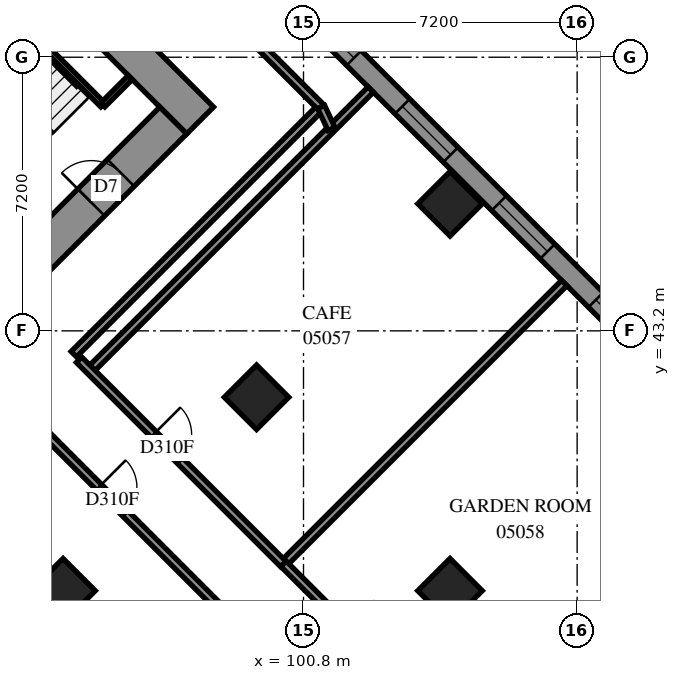
"""IFC4 building model, lengths in metres.
Left out: names, types, materials, properties, quantities, classifications, styles, units other than length and angle.
Written with IfcOpenShell. Run it as: python <this file> out.ifc"""

import sys

from ifc_helpers import new_model, si_unit, direction, frame, frame_2d, origin, origin_2d, place, context, subcontext, project, spatial, polyline, rectangle, outline, extrude, element, fill, save


model = new_model("IFC4")
c1 = context("Model", 3, precision=1e-05, world=origin(), true_north=direction((0.0, 1.0)))
c2 = subcontext(c1, "Body", "Model", "MODEL_VIEW")
j1 = project(units=[si_unit("LENGTHUNIT", "METRE"), si_unit("PLANEANGLEUNIT", "RADIAN")], contexts=[c1])
p1 = place(None, origin())
s1 = spatial("IfcSite", under=j1, at=p1, CompositionType="ELEMENT")
p2 = place(p1, origin())
s2 = spatial("IfcBuilding", under=s1, at=p2, CompositionType="ELEMENT")
p3 = place(p2, frame((0.0, 0.0, 22.8)))
s3 = spatial("IfcBuildingStorey", under=s2, at=p3, CompositionType="ELEMENT", Elevation=22.8)
for number, where, z_axis, x_axis in (
    (1, (104.656, 46.544, 0.0), (0.0, 0.0, 1.0), (0.707, -0.707, 0.0)),
    (2, (99.565, 41.453, 0.0), (0.0, 0.0, 1.0), (0.707, -0.707, 0.0)),
    (3, (94.474, 36.362, 0.0), (0.0, 0.0, 1.0), (0.707, -0.707, 0.0)),
    (4, (104.656, 36.362, 0.0), (0.0, 0.0, 1.0), (0.707, -0.707, 0.0)),
):
    element("IfcColumn", number, at=place(p3, frame(where, z_axis=z_axis, x_axis=x_axis)), inside=s3, PredefinedType="COLUMN", context=c2, shape_type="SweptSolid", body=[
        extrude(rectangle(XDim=1.2, YDim=1.2, at=origin_2d()), origin(), (0.0, 0.0, 1.0), 3.9),
    ])
p4 = place(p3, frame((86.483, 60.333, -0.4), z_axis=(0.0, 0.0, 1.0), x_axis=(0.70710983, -0.7071037324, 0.0)))
e5 = element("IfcWall", 5, at=p4, inside=s3, PredefinedType="SHEAR", context=c2, shape_type="SweptSolid", body=[
    extrude(rectangle(XDim=16.4, YDim=1.0, at=frame_2d((8.2, 0.0))), origin(), (0.0, 0.0, 1.0), 3.6),
])
p5 = place(p4, frame((11.0, 0.0, 0.4)))
e6 = element("IfcOpeningElement", 6, at=p5, cuts=e5, PredefinedType="OPENING", context=c2, shape_type="SweptSolid", body=[
    extrude(rectangle(XDim=0.8, YDim=2.1, at=frame_2d((0.4, 1.05))), frame((0.0, 0.51, 0.0), z_axis=(0.0, -1.0, 0.0), x_axis=(1.0, 0.0, 0.0)), (0.0, 0.0, 1.0), 1.02),
])
p6 = place(p3, frame((87.19, 38.554, -0.4), z_axis=(0.0, 0.0, 1.0), x_axis=(0.707103309, 0.7071102534, 0.0)))
e7 = element("IfcWall", 7, at=p6, inside=s3, PredefinedType="SHEAR", context=c2, shape_type="SweptSolid", body=[
    extrude(rectangle(XDim=14.4, YDim=1.0, at=frame_2d((7.2, 0.0))), origin(), (0.0, 0.0, 1.0), 3.6),
])
p7 = place(p6, frame((4.55, 0.0, 0.4)))
e8 = element("IfcOpeningElement", 8, at=p7, cuts=e7, PredefinedType="OPENING", context=c2, shape_type="SweptSolid", body=[
    extrude(rectangle(XDim=1.1, YDim=2.1, at=frame_2d((0.55, 1.05))), frame((0.0, 0.51, 0.0), z_axis=(0.0, -1.0, 0.0), x_axis=(1.0, 0.0, 0.0)), (0.0, 0.0, 1.0), 1.02),
])
p8 = place(p6, frame((11.35, 0.0, 0.4)))
e9 = element("IfcOpeningElement", 9, at=p8, cuts=e7, PredefinedType="OPENING", context=c2, shape_type="SweptSolid", body=[
    extrude(rectangle(XDim=1.1, YDim=2.1, at=frame_2d((0.55, 1.05))), frame((0.0, 0.51, 0.0), z_axis=(0.0, -1.0, 0.0), x_axis=(1.0, 0.0, 0.0)), (0.0, 0.0, 1.0), 1.02),
])
p9 = place(p3, frame((117.843, 34.665, 0.0), z_axis=(0.0, 0.0, 1.0), x_axis=(-0.7071067812, 0.7071067812, 0.0)))
e10 = element("IfcWall", 10, at=p9, inside=s3, PredefinedType="SOLIDWALL", context=c2, shape_type="SweptSolid", body=[
    extrude(outline(polyline([(-0.275, -0.275), (54.222, -0.275), (53.994, 0.275), (0.275, 0.275), (-0.275, -0.275)])), origin(), (0.0, 0.0, 1.0), 3.9),
])
p10 = place(p9, frame((0.8, 0.0, 0.7)))
e11 = element("IfcOpeningElement", 11, at=p10, cuts=e10, PredefinedType="OPENING", context=c2, shape_type="SweptSolid", body=[
    extrude(rectangle(XDim=1.8, YDim=2.4, at=frame_2d((0.9, 1.2))), frame((0.0, 0.285, 0.0), z_axis=(0.0, -1.0, 0.0), x_axis=(1.0, 0.0, 0.0)), (0.0, 0.0, 1.0), 0.57),
])
p11 = place(p9, frame((4.225, 0.0, 0.7)))
e12 = element("IfcOpeningElement", 12, at=p11, cuts=e10, PredefinedType="OPENING", context=c2, shape_type="SweptSolid", body=[
    extrude(rectangle(XDim=1.8, YDim=2.4, at=frame_2d((0.9, 1.2))), frame((0.0, 0.285, 0.0), z_axis=(0.0, -1.0, 0.0), x_axis=(1.0, 0.0, 0.0)), (0.0, 0.0, 1.0), 0.57),
])
p12 = place(p9, frame((7.825, 0.0, 0.7)))
e13 = element("IfcOpeningElement", 13, at=p12, cuts=e10, PredefinedType="OPENING", context=c2, shape_type="SweptSolid", body=[
    extrude(rectangle(XDim=1.8, YDim=2.4, at=frame_2d((0.9, 1.2))), frame((0.0, 0.285, 0.0), z_axis=(0.0, -1.0, 0.0), x_axis=(1.0, 0.0, 0.0)), (0.0, 0.0, 1.0), 0.57),
])
p13 = place(p9, frame((11.425, 0.0, 0.7)))
e14 = element("IfcOpeningElement", 14, at=p13, cuts=e10, PredefinedType="OPENING", context=c2, shape_type="SweptSolid", body=[
    extrude(rectangle(XDim=1.8, YDim=2.4, at=frame_2d((0.9, 1.2))), frame((0.0, 0.285, 0.0), z_axis=(0.0, -1.0, 0.0), x_axis=(1.0, 0.0, 0.0)), (0.0, 0.0, 1.0), 0.57),
])
p14 = place(p9, frame((15.025, 0.0, 0.7)))
e15 = element("IfcOpeningElement", 15, at=p14, cuts=e10, PredefinedType="OPENING", context=c2, shape_type="SweptSolid", body=[
    extrude(rectangle(XDim=1.8, YDim=2.4, at=frame_2d((0.9, 1.2))), frame((0.0, 0.285, 0.0), z_axis=(0.0, -1.0, 0.0), x_axis=(1.0, 0.0, 0.0)), (0.0, 0.0, 1.0), 0.57),
])
p15 = place(p9, frame((18.625, 0.0, 0.7)))
e16 = element("IfcOpeningElement", 16, at=p15, cuts=e10, PredefinedType="OPENING", context=c2, shape_type="SweptSolid", body=[
    extrude(rectangle(XDim=1.8, YDim=2.4, at=frame_2d((0.9, 1.2))), frame((0.0, 0.285, 0.0), z_axis=(0.0, -1.0, 0.0), x_axis=(1.0, 0.0, 0.0)), (0.0, 0.0, 1.0), 0.57),
])
p16 = place(p9, frame((22.225, 0.0, 0.7)))
e17 = element("IfcOpeningElement", 17, at=p16, cuts=e10, PredefinedType="OPENING", context=c2, shape_type="SweptSolid", body=[
    extrude(rectangle(XDim=1.8, YDim=2.4, at=frame_2d((0.9, 1.2))), frame((0.0, 0.285, 0.0), z_axis=(0.0, -1.0, 0.0), x_axis=(1.0, 0.0, 0.0)), (0.0, 0.0, 1.0), 0.57),
])
p17 = place(p9, frame((25.825, 0.0, 0.7)))
e18 = element("IfcOpeningElement", 18, at=p17, cuts=e10, PredefinedType="OPENING", context=c2, shape_type="SweptSolid", body=[
    extrude(rectangle(XDim=1.8, YDim=2.4, at=frame_2d((0.9, 1.2))), frame((0.0, 0.285, 0.0), z_axis=(0.0, -1.0, 0.0), x_axis=(1.0, 0.0, 0.0)), (0.0, 0.0, 1.0), 0.57),
])
p18 = place(p9, frame((29.425, 0.0, 0.7)))
e19 = element("IfcOpeningElement", 19, at=p18, cuts=e10, PredefinedType="OPENING", context=c2, shape_type="SweptSolid", body=[
    extrude(rectangle(XDim=1.8, YDim=2.4, at=frame_2d((0.9, 1.2))), frame((0.0, 0.285, 0.0), z_axis=(0.0, -1.0, 0.0), x_axis=(1.0, 0.0, 0.0)), (0.0, 0.0, 1.0), 0.57),
])
p19 = place(p9, frame((33.025, 0.0, 0.7)))
e20 = element("IfcOpeningElement", 20, at=p19, cuts=e10, PredefinedType="OPENING", context=c2, shape_type="SweptSolid", body=[
    extrude(rectangle(XDim=1.8, YDim=2.4, at=frame_2d((0.9, 1.2))), frame((0.0, 0.285, 0.0), z_axis=(0.0, -1.0, 0.0), x_axis=(1.0, 0.0, 0.0)), (0.0, 0.0, 1.0), 0.57),
])
p20 = place(p9, frame((36.625, 0.0, 0.7)))
e21 = element("IfcOpeningElement", 21, at=p20, cuts=e10, PredefinedType="OPENING", context=c2, shape_type="SweptSolid", body=[
    extrude(rectangle(XDim=1.8, YDim=2.4, at=frame_2d((0.9, 1.2))), frame((0.0, 0.285, 0.0), z_axis=(0.0, -1.0, 0.0), x_axis=(1.0, 0.0, 0.0)), (0.0, 0.0, 1.0), 0.57),
])
p21 = place(p9, frame((40.225, 0.0, 0.7)))
e22 = element("IfcOpeningElement", 22, at=p21, cuts=e10, PredefinedType="OPENING", context=c2, shape_type="SweptSolid", body=[
    extrude(rectangle(XDim=1.8, YDim=2.4, at=frame_2d((0.9, 1.2))), frame((0.0, 0.285, 0.0), z_axis=(0.0, -1.0, 0.0), x_axis=(1.0, 0.0, 0.0)), (0.0, 0.0, 1.0), 0.57),
])
p22 = place(p9, frame((43.825, 0.0, 0.7)))
e23 = element("IfcOpeningElement", 23, at=p22, cuts=e10, PredefinedType="OPENING", context=c2, shape_type="SweptSolid", body=[
    extrude(rectangle(XDim=1.8, YDim=2.4, at=frame_2d((0.9, 1.2))), frame((0.0, 0.285, 0.0), z_axis=(0.0, -1.0, 0.0), x_axis=(1.0, 0.0, 0.0)), (0.0, 0.0, 1.0), 0.57),
])
p23 = place(p9, frame((47.425, 0.0, 0.7)))
e24 = element("IfcOpeningElement", 24, at=p23, cuts=e10, PredefinedType="OPENING", context=c2, shape_type="SweptSolid", body=[
    extrude(rectangle(XDim=1.8, YDim=2.4, at=frame_2d((0.9, 1.2))), frame((0.0, 0.285, 0.0), z_axis=(0.0, -1.0, 0.0), x_axis=(1.0, 0.0, 0.0)), (0.0, 0.0, 1.0), 0.57),
])
p24 = place(p9, frame((51.06, 0.0, 0.7)))
e25 = element("IfcOpeningElement", 25, at=p24, cuts=e10, PredefinedType="OPENING", context=c2, shape_type="SweptSolid", body=[
    extrude(rectangle(XDim=1.8, YDim=2.4, at=frame_2d((0.9, 1.2))), frame((0.0, 0.285, 0.0), z_axis=(0.0, -1.0, 0.0), x_axis=(1.0, 0.0, 0.0)), (0.0, 0.0, 1.0), 0.57),
])
p25 = place(p3, frame((77.07, 42.275, 0.0), z_axis=(0.0, 0.0, 1.0), x_axis=(0.7071067812, -0.7071067812, 0.0)))
e26 = element("IfcWall", 26, at=p25, inside=s3, PredefinedType="SOLIDWALL", context=c2, shape_type="SweptSolid", body=[
    extrude(outline(polyline([(0.114, -0.275), (39.288, -0.275), (38.737, 0.275), (-0.114, 0.275), (0.114, -0.275)])), origin(), (0.0, 0.0, 1.0), 3.9),
])
p26 = place(p25, frame((2.837, 0.0, 0.7)))
e27 = element("IfcOpeningElement", 27, at=p26, cuts=e26, PredefinedType="OPENING", context=c2, shape_type="SweptSolid", body=[
    extrude(rectangle(XDim=1.8, YDim=2.4, at=frame_2d((0.9, 1.2))), frame((0.0, 0.285, 0.0), z_axis=(0.0, -1.0, 0.0), x_axis=(1.0, 0.0, 0.0)), (0.0, 0.0, 1.0), 0.57),
])
p27 = place(p25, frame((6.588, 0.0, 0.7)))
e28 = element("IfcOpeningElement", 28, at=p27, cuts=e26, PredefinedType="OPENING", context=c2, shape_type="SweptSolid", body=[
    extrude(rectangle(XDim=1.8, YDim=2.4, at=frame_2d((0.9, 1.2))), frame((0.0, 0.285, 0.0), z_axis=(0.0, -1.0, 0.0), x_axis=(1.0, 0.0, 0.0)), (0.0, 0.0, 1.0), 0.57),
])
p28 = place(p25, frame((10.188, 0.0, 0.7)))
e29 = element("IfcOpeningElement", 29, at=p28, cuts=e26, PredefinedType="OPENING", context=c2, shape_type="SweptSolid", body=[
    extrude(rectangle(XDim=1.8, YDim=2.4, at=frame_2d((0.9, 1.2))), frame((0.0, 0.285, 0.0), z_axis=(0.0, -1.0, 0.0), x_axis=(1.0, 0.0, 0.0)), (0.0, 0.0, 1.0), 0.57),
])
p29 = place(p25, frame((13.787, 0.0, 0.7)))
e30 = element("IfcOpeningElement", 30, at=p29, cuts=e26, PredefinedType="OPENING", context=c2, shape_type="SweptSolid", body=[
    extrude(rectangle(XDim=1.8, YDim=2.4, at=frame_2d((0.9, 1.2))), frame((0.0, 0.285, 0.0), z_axis=(0.0, -1.0, 0.0), x_axis=(1.0, 0.0, 0.0)), (0.0, 0.0, 1.0), 0.57),
])
p30 = place(p25, frame((17.387, 0.0, 0.7)))
e31 = element("IfcOpeningElement", 31, at=p30, cuts=e26, PredefinedType="OPENING", context=c2, shape_type="SweptSolid", body=[
    extrude(rectangle(XDim=1.8, YDim=2.4, at=frame_2d((0.9, 1.2))), frame((0.0, 0.285, 0.0), z_axis=(0.0, -1.0, 0.0), x_axis=(1.0, 0.0, 0.0)), (0.0, 0.0, 1.0), 0.57),
])
p31 = place(p25, frame((20.988, 0.0, 0.7)))
e32 = element("IfcOpeningElement", 32, at=p31, cuts=e26, PredefinedType="OPENING", context=c2, shape_type="SweptSolid", body=[
    extrude(rectangle(XDim=1.8, YDim=2.4, at=frame_2d((0.9, 1.2))), frame((0.0, 0.285, 0.0), z_axis=(0.0, -1.0, 0.0), x_axis=(1.0, 0.0, 0.0)), (0.0, 0.0, 1.0), 0.57),
])
p32 = place(p25, frame((24.587, 0.0, 0.7)))
e33 = element("IfcOpeningElement", 33, at=p32, cuts=e26, PredefinedType="OPENING", context=c2, shape_type="SweptSolid", body=[
    extrude(rectangle(XDim=1.8, YDim=2.4, at=frame_2d((0.9, 1.2))), frame((0.0, 0.285, 0.0), z_axis=(0.0, -1.0, 0.0), x_axis=(1.0, 0.0, 0.0)), (0.0, 0.0, 1.0), 0.57),
])
p33 = place(p25, frame((28.188, 0.0, 0.7)))
e34 = element("IfcOpeningElement", 34, at=p33, cuts=e26, PredefinedType="OPENING", context=c2, shape_type="SweptSolid", body=[
    extrude(rectangle(XDim=1.8, YDim=2.4, at=frame_2d((0.9, 1.2))), frame((0.0, 0.285, 0.0), z_axis=(0.0, -1.0, 0.0), x_axis=(1.0, 0.0, 0.0)), (0.0, 0.0, 1.0), 0.57),
])
p34 = place(p25, frame((31.788, 0.0, 0.7)))
e35 = element("IfcOpeningElement", 35, at=p34, cuts=e26, PredefinedType="OPENING", context=c2, shape_type="SweptSolid", body=[
    extrude(rectangle(XDim=1.8, YDim=2.4, at=frame_2d((0.9, 1.2))), frame((0.0, 0.285, 0.0), z_axis=(0.0, -1.0, 0.0), x_axis=(1.0, 0.0, 0.0)), (0.0, 0.0, 1.0), 0.57),
])
p35 = place(p25, frame((35.388, 0.0, 0.7)))
e36 = element("IfcOpeningElement", 36, at=p35, cuts=e26, PredefinedType="OPENING", context=c2, shape_type="SweptSolid", body=[
    extrude(rectangle(XDim=1.8, YDim=2.4, at=frame_2d((0.9, 1.2))), frame((0.0, 0.285, 0.0), z_axis=(0.0, -1.0, 0.0), x_axis=(1.0, 0.0, 0.0)), (0.0, 0.0, 1.0), 0.57),
])
p36 = place(p3, frame((91.313, 53.354, 0.0), z_axis=(0.0, 0.0, 1.0), x_axis=(0.7071067812, -0.7071067812, 0.0)))
e37 = element("IfcWall", 37, at=p36, inside=s3, PredefinedType="PARTITIONING", context=c2, shape_type="SweptSolid", body=[
    extrude(rectangle(XDim=5.95, YDim=0.15, at=frame_2d((2.975, 0.0))), origin(), (0.0, 0.0, 1.0), 3.9),
])
p37 = place(p3, frame((95.52, 49.146, 0.0), z_axis=(0.0, 0.0, 1.0), x_axis=(0.7071067812, 0.7071067812, 0.0)))
e38 = element("IfcWall", 38, at=p37, inside=s3, PredefinedType="PARTITIONING", context=c2, shape_type="SweptSolid", body=[
    extrude(rectangle(XDim=1.02, YDim=0.15, at=frame_2d((0.51, 0.0))), origin(), (0.0, 0.0, 1.0), 3.9),
])
for number, where, z_axis, x_axis in (
    (39, (105.362, 31.978, 0.0), (0.0, 0.0, 1.0), (0.707, 0.707, 0.0)),
    (40, (95.179, 42.161, 0.0), (0.0, 0.0, 1.0), (0.707, 0.707, 0.0)),
    (41, (100.271, 37.069, 0.0), (0.0, 0.0, 1.0), (0.707, 0.707, 0.0)),
):
    element("IfcWall", number, at=place(p3, frame(where, z_axis=z_axis, x_axis=x_axis)), inside=s3, PredefinedType="PARTITIONING", context=c2, shape_type="SweptSolid", body=[
        extrude(rectangle(XDim=10.45, YDim=0.2, at=frame_2d((5.225, 0.0))), origin(), (0.0, 0.0, 1.0), 3.9),
    ])
p38 = place(p3, frame((94.757, 42.587, 0.0), z_axis=(0.0, 0.0, 1.0), x_axis=(0.7071067812, 0.7071067812, 0.0)))
e42 = element("IfcWall", 42, at=p38, inside=s3, PredefinedType="PARTITIONING", context=c2, shape_type="SweptSolid", body=[
    extrude(rectangle(XDim=9.198, YDim=0.2, at=frame_2d((4.599, 0.0))), origin(), (0.0, 0.0, 1.0), 3.9),
])
p39 = place(p3, frame((93.339, 41.167, 0.0), z_axis=(0.0, 0.0, 1.0), x_axis=(0.7071067812, -0.7071067812, 0.0)))
e43 = element("IfcWall", 43, at=p39, inside=s3, PredefinedType="PARTITIONING", context=c2, shape_type="SweptSolid", body=[
    extrude(rectangle(XDim=7.801, YDim=0.2, at=frame_2d((3.9, 0.0))), origin(), (0.0, 0.0, 1.0), 3.9),
])
p40 = place(p39, frame((2.938, 0.0, 0.0)))
e44 = element("IfcOpeningElement", 44, at=p40, cuts=e43, PredefinedType="OPENING", context=c2, shape_type="SweptSolid", body=[
    extrude(rectangle(XDim=1.0, YDim=2.1, at=frame_2d((0.5, 1.05))), frame((0.0, 0.11, 0.0), z_axis=(0.0, -1.0, 0.0), x_axis=(1.0, 0.0, 0.0)), (0.0, 0.0, 1.0), 0.22),
])
p41 = place(p3, frame((94.895, 42.439, 0.0), z_axis=(0.0, 0.0, 1.0), x_axis=(0.7071067812, -0.7071067812, 0.0)))
e45 = element("IfcWall", 45, at=p41, inside=s3, PredefinedType="PARTITIONING", context=c2, shape_type="SweptSolid", body=[
    extrude(rectangle(XDim=7.6, YDim=0.2, at=frame_2d((3.8, 0.0))), origin(), (0.0, 0.0, 1.0), 3.9),
])
p42 = place(p41, frame((2.773, 0.0, 0.0)))
e46 = element("IfcOpeningElement", 46, at=p42, cuts=e45, PredefinedType="OPENING", context=c2, shape_type="SweptSolid", body=[
    extrude(rectangle(XDim=1.0, YDim=2.1, at=frame_2d((0.5, 1.05))), frame((0.0, 0.11, 0.0), z_axis=(0.0, -1.0, 0.0), x_axis=(1.0, 0.0, 0.0)), (0.0, 0.0, 1.0), 0.22),
])
p43 = place(p3, frame((100.275, 37.071, 0.0), z_axis=(0.0, 0.0, 1.0), x_axis=(0.7073845681, -0.7068288851, 0.0)))
e47 = element("IfcWall", 47, at=p43, inside=s3, PredefinedType="PARTITIONING", context=c2, shape_type="SweptSolid", body=[
    extrude(rectangle(XDim=3.599, YDim=0.2, at=frame_2d((1.8, 0.0))), origin(), (0.0, 0.0, 1.0), 3.9),
])
p44 = place(p43, frame((2.373, 0.0, 0.0)))
e48 = element("IfcOpeningElement", 48, at=p44, cuts=e47, PredefinedType="OPENING", context=c2, shape_type="SweptSolid", body=[
    extrude(rectangle(XDim=1.0, YDim=2.1, at=frame_2d((0.5, 1.05))), frame((0.0, 0.11, 0.0), z_axis=(0.0, -1.0, 0.0), x_axis=(1.0, 0.0, 0.0)), (0.0, 0.0, 1.0), 0.22),
])
p45 = place(p3, frame((99.312, 51.032, 0.0), z_axis=(0.0, 0.0, 1.0), x_axis=(0.7071067812, -0.7071067812, 0.0)))
e49 = element("IfcWall", 49, at=p45, inside=s3, PredefinedType="PARTITIONING", context=c2, shape_type="SweptSolid", body=[
    extrude(rectangle(XDim=2.752, YDim=0.2, at=frame_2d((1.376, 0.0))), origin(), (0.0, 0.0, 1.0), 3.9),
])
p46 = place(p3, frame((101.264, 49.091, 0.0), z_axis=(0.0, 0.0, 1.0), x_axis=(0.4270063054, -0.9042486467, 0.0)))
e50 = element("IfcWall", 50, at=p46, inside=s3, PredefinedType="PARTITIONING", context=c2, shape_type="SweptSolid", body=[
    extrude(rectangle(XDim=0.637, YDim=0.2, at=frame_2d((0.319, 0.0))), origin(), (0.0, 0.0, 1.0), 3.9),
])
p47 = place(p13, origin())
e51 = element("IfcWindow", 51, at=p47, inside=s3, PartitioningType="SINGLE_PANEL", PredefinedType="WINDOW", context=c2, shape_type="SweptSolid", body=[
    extrude(rectangle(XDim=1.8, YDim=2.4, at=frame_2d((0.9, 1.2))), frame((0.0, 0.155, 0.0), z_axis=(0.0, -1.0, 0.0), x_axis=(1.0, 0.0, 0.0)), (0.0, 0.0, 1.0), 0.06),
])
fill(e14, e51)
p48 = place(p14, origin())
e52 = element("IfcWindow", 52, at=p48, inside=s3, PartitioningType="SINGLE_PANEL", PredefinedType="WINDOW", context=c2, shape_type="SweptSolid", body=[
    extrude(rectangle(XDim=1.8, YDim=2.4, at=frame_2d((0.9, 1.2))), frame((0.0, 0.155, 0.0), z_axis=(0.0, -1.0, 0.0), x_axis=(1.0, 0.0, 0.0)), (0.0, 0.0, 1.0), 0.06),
])
fill(e15, e52)
p49 = place(p15, origin())
e53 = element("IfcWindow", 53, at=p49, inside=s3, PartitioningType="SINGLE_PANEL", PredefinedType="WINDOW", context=c2, shape_type="SweptSolid", body=[
    extrude(rectangle(XDim=1.8, YDim=2.4, at=frame_2d((0.9, 1.2))), frame((0.0, 0.155, 0.0), z_axis=(0.0, -1.0, 0.0), x_axis=(1.0, 0.0, 0.0)), (0.0, 0.0, 1.0), 0.06),
])
fill(e16, e53)
p50 = place(p16, origin())
e54 = element("IfcWindow", 54, at=p50, inside=s3, PartitioningType="SINGLE_PANEL", PredefinedType="WINDOW", context=c2, shape_type="SweptSolid", body=[
    extrude(rectangle(XDim=1.8, YDim=2.4, at=frame_2d((0.9, 1.2))), frame((0.0, 0.155, 0.0), z_axis=(0.0, -1.0, 0.0), x_axis=(1.0, 0.0, 0.0)), (0.0, 0.0, 1.0), 0.06),
])
fill(e17, e54)
p51 = place(p8, origin())
e55 = element("IfcDoor", 55, at=p51, inside=s3, OperationType="SINGLE_SWING_RIGHT", PredefinedType="DOOR", context=c2, shape_type="SweptSolid", body=[
    extrude(rectangle(XDim=1.1, YDim=2.1, at=frame_2d((0.55, 1.05))), frame((0.0, 0.025, 0.0), z_axis=(0.0, -1.0, 0.0), x_axis=(1.0, 0.0, 0.0)), (0.0, 0.0, 1.0), 0.05),
])
fill(e9, e55)
p52 = place(p42, origin())
e56 = element("IfcDoor", 56, at=p52, inside=s3, OperationType="SINGLE_SWING_RIGHT", PredefinedType="DOOR", context=c2, shape_type="SweptSolid", body=[
    extrude(rectangle(XDim=1.0, YDim=2.1, at=frame_2d((0.5, 1.05))), frame((0.0, 0.025, 0.0), z_axis=(0.0, -1.0, 0.0), x_axis=(1.0, 0.0, 0.0)), (0.0, 0.0, 1.0), 0.05),
])
fill(e46, e56)
p53 = place(p40, origin())
e57 = element("IfcDoor", 57, at=p53, inside=s3, OperationType="SINGLE_SWING_LEFT", PredefinedType="DOOR", context=c2, shape_type="SweptSolid", body=[
    extrude(rectangle(XDim=1.0, YDim=2.1, at=frame_2d((0.5, 1.05))), frame((0.0, 0.025, 0.0), z_axis=(0.0, -1.0, 0.0), x_axis=(1.0, 0.0, 0.0)), (0.0, 0.0, 1.0), 0.05),
])
fill(e44, e57)
save(model, sys.argv[1])
